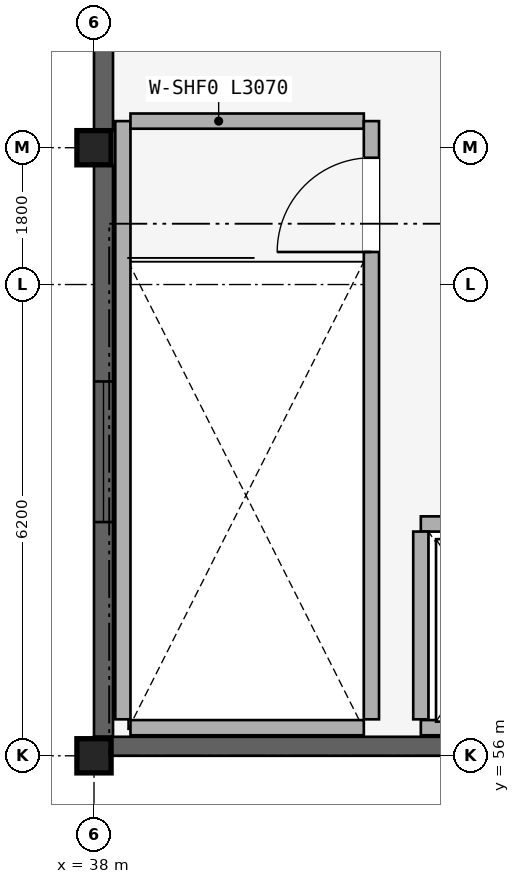
"""IFC4 building model, lengths in metres.
Left out: names, types, materials, properties, quantities, classifications, styles, units other than length and angle.
Written with IfcOpenShell. Run it as: python <this file> out.ifc"""

import sys

from ifc_helpers import new_model, si_unit, direction, frame, frame_2d, origin, origin_2d, place, context, subcontext, project, spatial, rectangle, extrude, element, fill, save


model = new_model("IFC4")
c1 = context("Model", 3, precision=1e-05, world=origin(), true_north=direction((0.0, 1.0)))
c2 = subcontext(c1, "Body", "Model", "MODEL_VIEW")
j1 = project(units=[si_unit("LENGTHUNIT", "METRE"), si_unit("PLANEANGLEUNIT", "RADIAN")], contexts=[c1])
p1 = place(None, origin())
s1 = spatial("IfcSite", under=j1, at=p1, CompositionType="ELEMENT")
p2 = place(p1, origin())
s2 = spatial("IfcBuilding", under=s1, at=p2, CompositionType="ELEMENT")
p3 = place(p2, frame((0.0, 0.0, 4.5)))
s3 = spatial("IfcBuildingStorey", under=s2, at=p3, CompositionType="ELEMENT", Elevation=4.5)
p4 = place(p3, frame((38.0, 56.0, 0.0), z_axis=(0.0, 0.0, 1.0), x_axis=(1.0, 0.0, 0.0)))
e1 = element("IfcColumn", 1, at=p4, inside=s3, PredefinedType="COLUMN", context=c2, shape_type="SweptSolid", body=[
    extrude(rectangle(XDim=0.45, YDim=0.45, at=origin_2d()), origin(), (0.0, 0.0, 1.0), 4.85),
])
p5 = place(p3, frame((38.0, 64.0, 0.0), z_axis=(0.0, 0.0, 1.0), x_axis=(1.0, 0.0, 0.0)))
e2 = element("IfcColumn", 2, at=p5, inside=s3, PredefinedType="COLUMN", context=c2, shape_type="SweptSolid", body=[
    extrude(rectangle(XDim=0.45, YDim=0.45, at=origin_2d()), origin(), (0.0, 0.0, 1.0), 4.0),
])
p6 = place(p3, frame((38.38, 56.48, 0.0), z_axis=(0.0, 0.0, 1.0), x_axis=(0.0, 1.0, 0.0)))
e3 = element("IfcWall", 3, at=p6, inside=s3, PredefinedType="STANDARD", context=c2, shape_type="SweptSolid", body=[
    extrude(rectangle(XDim=7.87, YDim=0.2, at=frame_2d((3.935, 0.0))), origin(), (0.0, 0.0, 1.0), 2.792),
])
for number, where, z_axis, x_axis in (
    (4, (38.48, 56.37, 0.0), (0.0, 0.0, 1.0), (1.0, 0.0, 0.0)),
    (5, (38.48, 64.35, 0.0), (0.0, 0.0, 1.0), (1.0, 0.0, 0.0)),
):
    element("IfcWall", number, at=place(p3, frame(where, z_axis=z_axis, x_axis=x_axis)), inside=s3, PredefinedType="STANDARD", context=c2, shape_type="SweptSolid", body=[
        extrude(rectangle(XDim=3.07, YDim=0.2, at=frame_2d((1.535, 0.0))), origin(), (0.0, 0.0, 1.0), 3.95),
    ])
p7 = place(p3, frame((41.65, 56.48, 0.0), z_axis=(0.0, 0.0, 1.0), x_axis=(0.0, 1.0, 0.0)))
e6 = element("IfcWall", 6, at=p7, inside=s3, PredefinedType="STANDARD", context=c2, shape_type="SweptSolid", body=[
    extrude(rectangle(XDim=7.87, YDim=0.2, at=frame_2d((3.935, 0.0))), origin(), (0.0, 0.0, 1.0), 3.95),
])
p8 = place(p7, frame((6.148, 0.0, 0.0)))
e7 = element("IfcOpeningElement", 7, at=p8, cuts=e6, PredefinedType="OPENING", context=c2, shape_type="SweptSolid", body=[
    extrude(rectangle(XDim=1.24, YDim=2.15, at=frame_2d((0.62, 1.075))), frame((0.0, 0.11, 0.0), z_axis=(0.0, -1.0, 0.0), x_axis=(1.0, 0.0, 0.0)), (0.0, 0.0, 1.0), 0.22),
])
p9 = place(p3, frame((42.3, 59.05, 0.0), z_axis=(0.0, 0.0, 1.0), x_axis=(1.0, 0.0, 0.0)))
e8 = element("IfcWall", 8, at=p9, inside=s3, PredefinedType="STANDARD", context=c2, shape_type="SweptSolid", body=[
    extrude(rectangle(XDim=2.0, YDim=0.2, at=frame_2d((1.0, 0.0))), origin(), (0.0, 0.0, 1.0), 3.95),
])
p10 = place(p9, frame((0.49, 0.0, 0.0)))
e9 = element("IfcOpeningElement", 9, at=p10, cuts=e8, PredefinedType="OPENING", context=c2, shape_type="SweptSolid", body=[
    extrude(rectangle(XDim=1.02, YDim=2.15, at=frame_2d((0.51, 1.075))), frame((0.0, 0.11, 0.0), z_axis=(0.0, -1.0, 0.0), x_axis=(1.0, 0.0, 0.0)), (0.0, 0.0, 1.0), 0.22),
])
p11 = place(p3, frame((42.3, 56.37, 0.0), z_axis=(0.0, 0.0, 1.0), x_axis=(1.0, 0.0, 0.0)))
e10 = element("IfcWall", 10, at=p11, inside=s3, PredefinedType="STANDARD", context=c2, shape_type="SweptSolid", body=[
    extrude(rectangle(XDim=2.0, YDim=0.2, at=frame_2d((1.0, 0.0))), origin(), (0.0, 0.0, 1.0), 3.95),
])
p12 = place(p3, frame((42.3, 56.48, 0.0), z_axis=(0.0, 0.0, 1.0), x_axis=(0.0, 1.0, 0.0)))
e11 = element("IfcWall", 11, at=p12, inside=s3, PredefinedType="STANDARD", context=c2, shape_type="SweptSolid", body=[
    extrude(rectangle(XDim=2.47, YDim=0.2, at=frame_2d((1.235, 0.0))), origin(), (0.0, 0.0, 1.0), 3.95),
])
p13 = place(p3, frame((38.0, 56.125, 0.0), z_axis=(0.0, 0.0, 1.0), x_axis=(1.0, 0.0, 0.0)))
e12 = element("IfcWall", 12, at=p13, inside=s3, PredefinedType="STANDARD", context=c2, shape_type="SweptSolid", body=[
    extrude(rectangle(XDim=6.771, YDim=0.25, at=frame_2d((3.386, 0.0))), origin(), (0.0, 0.0, 1.0), 3.442),
])
p14 = place(p13, frame((4.9, 0.0, 0.88)))
e13 = element("IfcOpeningElement", 13, at=p14, cuts=e12, PredefinedType="OPENING", context=c2, shape_type="SweptSolid", body=[
    extrude(rectangle(XDim=1.2, YDim=1.5, at=frame_2d((0.6, 0.75))), frame((0.0, 0.135, 0.0), z_axis=(0.0, -1.0, 0.0), x_axis=(1.0, 0.0, 0.0)), (0.0, 0.0, 1.0), 0.27),
])
p15 = place(p3, frame((38.125, 56.253, 0.0), z_axis=(0.0, 0.0, 1.0), x_axis=(0.0, 1.0, 0.0)))
e14 = element("IfcWall", 14, at=p15, inside=s3, PredefinedType="STANDARD", context=c2, shape_type="SweptSolid", body=[
    extrude(rectangle(XDim=7.519, YDim=0.25, at=frame_2d((3.759, 0.0))), origin(), (0.0, 0.0, 1.0), 3.442),
])
p16 = place(p15, frame((2.822, 0.0, 0.88)))
e15 = element("IfcOpeningElement", 15, at=p16, cuts=e14, PredefinedType="OPENING", context=c2, shape_type="SweptSolid", body=[
    extrude(rectangle(XDim=1.85, YDim=1.9, at=frame_2d((0.925, 0.95))), frame((0.0, 0.135, 0.0), z_axis=(0.0, -1.0, 0.0), x_axis=(1.0, 0.0, 0.0)), (0.0, 0.0, 1.0), 0.27),
])
p17 = place(p3, frame((38.125, 64.229, 0.0), z_axis=(0.0, 0.0, 1.0), x_axis=(0.0, 1.0, 0.0)))
e16 = element("IfcWall", 16, at=p17, inside=s3, PredefinedType="STANDARD", context=c2, shape_type="SweptSolid", body=[
    extrude(rectangle(XDim=7.543, YDim=0.25, at=frame_2d((3.771, 0.0))), origin(), (0.0, 0.0, 1.0), 2.792),
])
p18 = place(p17, frame((2.846, 0.0, 0.692)))
e17 = element("IfcOpeningElement", 17, at=p18, cuts=e16, PredefinedType="OPENING", context=c2, shape_type="SweptSolid", body=[
    extrude(rectangle(XDim=1.85, YDim=1.9, at=frame_2d((0.925, 0.95))), frame((0.0, 0.135, 0.0), z_axis=(0.0, -1.0, 0.0), x_axis=(1.0, 0.0, 0.0)), (0.0, 0.0, 1.0), 0.27),
])
p19 = place(p16, origin())
e18 = element("IfcWindow", 18, at=p19, inside=s3, PartitioningType="DOUBLE_PANEL_VERTICAL", PredefinedType="WINDOW", context=c2, shape_type="SweptSolid", body=[
    extrude(rectangle(XDim=1.85, YDim=1.9, at=frame_2d((0.925, 0.95))), frame((0.0, 0.03, 0.0), z_axis=(0.0, -1.0, 0.0), x_axis=(1.0, 0.0, 0.0)), (0.0, 0.0, 1.0), 0.06),
])
fill(e15, e18)
p20 = place(p8, origin())
e19 = element("IfcDoor", 19, at=p20, inside=s3, OperationType="SINGLE_SWING_LEFT", PredefinedType="DOOR", context=c2, shape_type="SweptSolid", body=[
    extrude(rectangle(XDim=1.24, YDim=2.15, at=frame_2d((0.62, 1.075))), frame((0.0, 0.025, 0.0), z_axis=(0.0, -1.0, 0.0), x_axis=(1.0, 0.0, 0.0)), (0.0, 0.0, 1.0), 0.05),
])
fill(e7, e19)
save(model, sys.argv[1])
